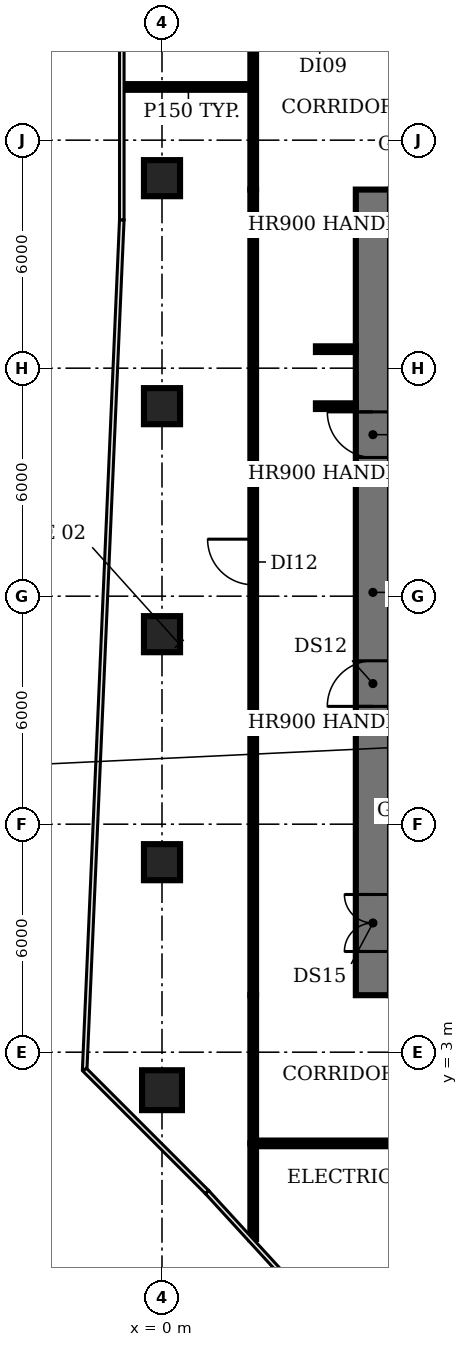
"""IFC4 building model, lengths in metres.
Left out: names, types, materials, properties, quantities, classifications, styles, units other than length and angle.
Written with IfcOpenShell. Run it as: python <this file> out.ifc"""

import sys

from ifc_helpers import new_model, si_unit, direction, frame, frame_2d, origin, origin_2d, place, context, subcontext, project, spatial, rectangle, circle, extrude, element, fill, save


model = new_model("IFC4")
c1 = context("Model", 3, precision=1e-05, world=origin(), true_north=direction((0.0, 1.0)))
c2 = subcontext(c1, "Body", "Model", "MODEL_VIEW")
j1 = project(units=[si_unit("LENGTHUNIT", "METRE"), si_unit("PLANEANGLEUNIT", "RADIAN")], contexts=[c1])
p1 = place(None, origin())
s1 = spatial("IfcSite", under=j1, at=p1, CompositionType="ELEMENT")
p2 = place(p1, origin())
s2 = spatial("IfcBuilding", under=s1, at=p2, CompositionType="ELEMENT")
p3 = place(p2, frame((0.0, 0.0, 41.6)))
s3 = spatial("IfcBuildingStorey", under=s2, at=p3, CompositionType="ELEMENT", Elevation=41.6)
p4 = place(p3, frame((0.0, 2.0, 0.0), z_axis=(0.0, 0.0, 1.0), x_axis=(1.0, 0.0, 0.0)))
e1 = element("IfcColumn", 1, at=p4, inside=s3, PredefinedType="COLUMN", context=c2, shape_type="SweptSolid", body=[
    extrude(circle(Radius=0.525, at=origin_2d()), origin(), (0.0, 0.0, 1.0), 3.85),
])
for number, where, z_axis, x_axis in (
    (2, (0.0, 8.0, 0.0), (0.0, 0.0, 1.0), (1.0, 0.0, 0.0)),
    (3, (0.0, 14.0, 0.0), (0.0, 0.0, 1.0), (1.0, 0.0, 0.0)),
    (4, (0.0, 20.0, 0.0), (0.0, 0.0, 1.0), (1.0, 0.0, 0.0)),
    (5, (0.0, 26.0, 0.0), (0.0, 0.0, 1.0), (1.0, 0.0, 0.0)),
):
    element("IfcColumn", number, at=place(p3, frame(where, z_axis=z_axis, x_axis=x_axis)), inside=s3, PredefinedType="COLUMN", context=c2, shape_type="SweptSolid", body=[
        extrude(rectangle(XDim=0.95, YDim=0.95, at=origin_2d()), origin(), (0.0, 0.0, 1.0), 3.85),
    ])
p5 = place(p3, frame((5.55, 4.5, 0.0), z_axis=(0.0, 0.0, 1.0), x_axis=(0.0, 1.0, 0.0)))
e6 = element("IfcWall", 6, at=p5, inside=s3, PredefinedType="SHEAR", context=c2, shape_type="SweptSolid", body=[
    extrude(rectangle(XDim=21.2, YDim=0.9, at=frame_2d((10.6, 0.0))), origin(), (0.0, 0.0, 1.0), 3.85),
])
p6 = place(p5, frame((1.15, 0.0, 0.0)))
e7 = element("IfcOpeningElement", 7, at=p6, cuts=e6, PredefinedType="OPENING", context=c2, shape_type="SweptSolid", body=[
    extrude(rectangle(XDim=1.5, YDim=2.1, at=frame_2d((0.75, 1.05))), frame((0.0, 0.46, 0.0), z_axis=(0.0, -1.0, 0.0), x_axis=(1.0, 0.0, 0.0)), (0.0, 0.0, 1.0), 0.92),
])
p7 = place(p5, frame((7.6, 0.0, 0.0)))
e8 = element("IfcOpeningElement", 8, at=p7, cuts=e6, PredefinedType="OPENING", context=c2, shape_type="SweptSolid", body=[
    extrude(rectangle(XDim=1.2, YDim=2.1, at=frame_2d((0.6, 1.05))), frame((0.0, 0.46, 0.0), z_axis=(0.0, -1.0, 0.0), x_axis=(1.0, 0.0, 0.0)), (0.0, 0.0, 1.0), 0.92),
])
p8 = place(p5, frame((14.15, 0.0, 0.0)))
e9 = element("IfcOpeningElement", 9, at=p8, cuts=e6, PredefinedType="OPENING", context=c2, shape_type="SweptSolid", body=[
    extrude(rectangle(XDim=1.2, YDim=2.1, at=frame_2d((0.6, 1.05))), frame((0.0, 0.46, 0.0), z_axis=(0.0, -1.0, 0.0), x_axis=(1.0, 0.0, 0.0)), (0.0, 0.0, 1.0), 0.92),
])
p9 = place(p3, frame((-1.01, 28.4, 0.0), z_axis=(0.0, 0.0, 1.0), x_axis=(1.0, 0.0, 0.0)))
e10 = element("IfcWall", 10, at=p9, inside=s3, PredefinedType="PARTITIONING", context=c2, shape_type="SweptSolid", body=[
    extrude(rectangle(XDim=3.41, YDim=0.15, at=frame_2d((1.705, 0.0))), origin(), (0.0, 0.0, 1.0), 2.83),
])
p10 = place(p3, frame((2.4, -1.918, 0.0), z_axis=(0.0, 0.0, 1.0), x_axis=(0.0, 1.0, 0.0)))
e11 = element("IfcWall", 11, at=p10, inside=s3, PredefinedType="PARTITIONING", context=c2, shape_type="SweptSolid", body=[
    extrude(rectangle(XDim=2.518, YDim=0.15, at=frame_2d((1.259, 0.0))), origin(), (0.0, 0.0, 1.0), 2.83),
])
p11 = place(p3, frame((2.4, 0.6, 0.0), z_axis=(0.0, 0.0, 1.0), x_axis=(0.0, 1.0, 0.0)))
e12 = element("IfcWall", 12, at=p11, inside=s3, PredefinedType="PARTITIONING", context=c2, shape_type="SweptSolid", body=[
    extrude(rectangle(XDim=3.9, YDim=0.15, at=frame_2d((1.95, 0.0))), origin(), (0.0, 0.0, 1.0), 2.83),
])
p12 = place(p3, frame((2.4, 4.5, 0.0), z_axis=(0.0, 0.0, 1.0), x_axis=(0.0, 1.0, 0.0)))
e13 = element("IfcWall", 13, at=p12, inside=s3, PredefinedType="PARTITIONING", context=c2, shape_type="SweptSolid", body=[
    extrude(rectangle(XDim=21.2, YDim=0.15, at=frame_2d((10.6, 0.0))), origin(), (0.0, 0.0, 1.0), 2.83),
])
p13 = place(p12, frame((10.8, 0.0, 0.0)))
e14 = element("IfcOpeningElement", 14, at=p13, cuts=e13, PredefinedType="OPENING", context=c2, shape_type="SweptSolid", body=[
    extrude(rectangle(XDim=1.2, YDim=2.1, at=frame_2d((0.6, 1.05))), frame((0.0, 0.085, 0.0), z_axis=(0.0, -1.0, 0.0), x_axis=(1.0, 0.0, 0.0)), (0.0, 0.0, 1.0), 0.17),
])
p14 = place(p3, frame((2.4, 25.7, 0.0), z_axis=(0.0, 0.0, 1.0), x_axis=(0.0, 1.0, 0.0)))
e15 = element("IfcWall", 15, at=p14, inside=s3, PredefinedType="PARTITIONING", context=c2, shape_type="SweptSolid", body=[
    extrude(rectangle(XDim=3.9, YDim=0.15, at=frame_2d((1.95, 0.0))), origin(), (0.0, 0.0, 1.0), 2.83),
])
for number, where, z_axis, x_axis in (
    (16, (4.05, 20.0, 0.0), (0.0, 0.0, 1.0), (1.0, 0.0, 0.0)),
    (17, (4.05, 21.5, 0.0), (0.0, 0.0, 1.0), (1.0, 0.0, 0.0)),
):
    element("IfcWall", number, at=place(p3, frame(where, z_axis=z_axis, x_axis=x_axis)), inside=s3, PredefinedType="PARTITIONING", context=c2, shape_type="SweptSolid", body=[
        extrude(rectangle(XDim=1.05, YDim=0.15, at=frame_2d((0.525, 0.0))), origin(), (0.0, 0.0, 1.0), 2.83),
    ])
p15 = place(p3, frame((27.6, 0.6, 0.0), z_axis=(0.0, 0.0, 1.0), x_axis=(-1.0, 0.0, 0.0)))
e18 = element("IfcWall", 18, at=p15, inside=s3, PredefinedType="PARTITIONING", context=c2, shape_type="SweptSolid", body=[
    extrude(rectangle(XDim=25.2, YDim=0.15, at=frame_2d((12.6, 0.0))), origin(), (0.0, 0.0, 1.0), 2.83),
])
p16 = place(p15, frame((12.1, 0.0, 0.0)))
e19 = element("IfcOpeningElement", 19, at=p16, cuts=e18, PredefinedType="OPENING", context=c2, shape_type="SweptSolid", body=[
    extrude(rectangle(XDim=1.2, YDim=2.1, at=frame_2d((0.6, 1.05))), frame((0.0, 0.085, 0.0), z_axis=(0.0, -1.0, 0.0), x_axis=(1.0, 0.0, 0.0)), (0.0, 0.0, 1.0), 0.17),
])
p17 = place(p6, origin())
e20 = element("IfcDoor", 20, at=p17, inside=s3, OperationType="DOUBLE_DOOR_SINGLE_SWING", PredefinedType="DOOR", context=c2, shape_type="SweptSolid", body=[
    extrude(rectangle(XDim=1.5, YDim=2.1, at=frame_2d((0.75, 1.05))), frame((0.0, 0.025, 0.0), z_axis=(0.0, -1.0, 0.0), x_axis=(1.0, 0.0, 0.0)), (0.0, 0.0, 1.0), 0.05),
])
fill(e7, e20)
p18 = place(p7, origin())
e21 = element("IfcDoor", 21, at=p18, inside=s3, OperationType="SINGLE_SWING_LEFT", PredefinedType="DOOR", context=c2, shape_type="SweptSolid", body=[
    extrude(rectangle(XDim=1.2, YDim=2.1, at=frame_2d((0.6, 1.05))), frame((0.0, 0.025, 0.0), z_axis=(0.0, -1.0, 0.0), x_axis=(1.0, 0.0, 0.0)), (0.0, 0.0, 1.0), 0.05),
])
fill(e8, e21)
p19 = place(p8, origin())
e22 = element("IfcDoor", 22, at=p19, inside=s3, OperationType="SINGLE_SWING_RIGHT", PredefinedType="DOOR", context=c2, shape_type="SweptSolid", body=[
    extrude(rectangle(XDim=1.2, YDim=2.1, at=frame_2d((0.6, 1.05))), frame((0.0, 0.025, 0.0), z_axis=(0.0, -1.0, 0.0), x_axis=(1.0, 0.0, 0.0)), (0.0, 0.0, 1.0), 0.05),
])
fill(e9, e22)
p20 = place(p13, origin())
e23 = element("IfcDoor", 23, at=p20, inside=s3, OperationType="SINGLE_SWING_RIGHT", PredefinedType="DOOR", context=c2, shape_type="SweptSolid", body=[
    extrude(rectangle(XDim=1.2, YDim=2.1, at=frame_2d((0.6, 1.05))), frame((0.0, 0.025, 0.0), z_axis=(0.0, -1.0, 0.0), x_axis=(1.0, 0.0, 0.0)), (0.0, 0.0, 1.0), 0.05),
])
fill(e14, e23)
save(model, sys.argv[1])
